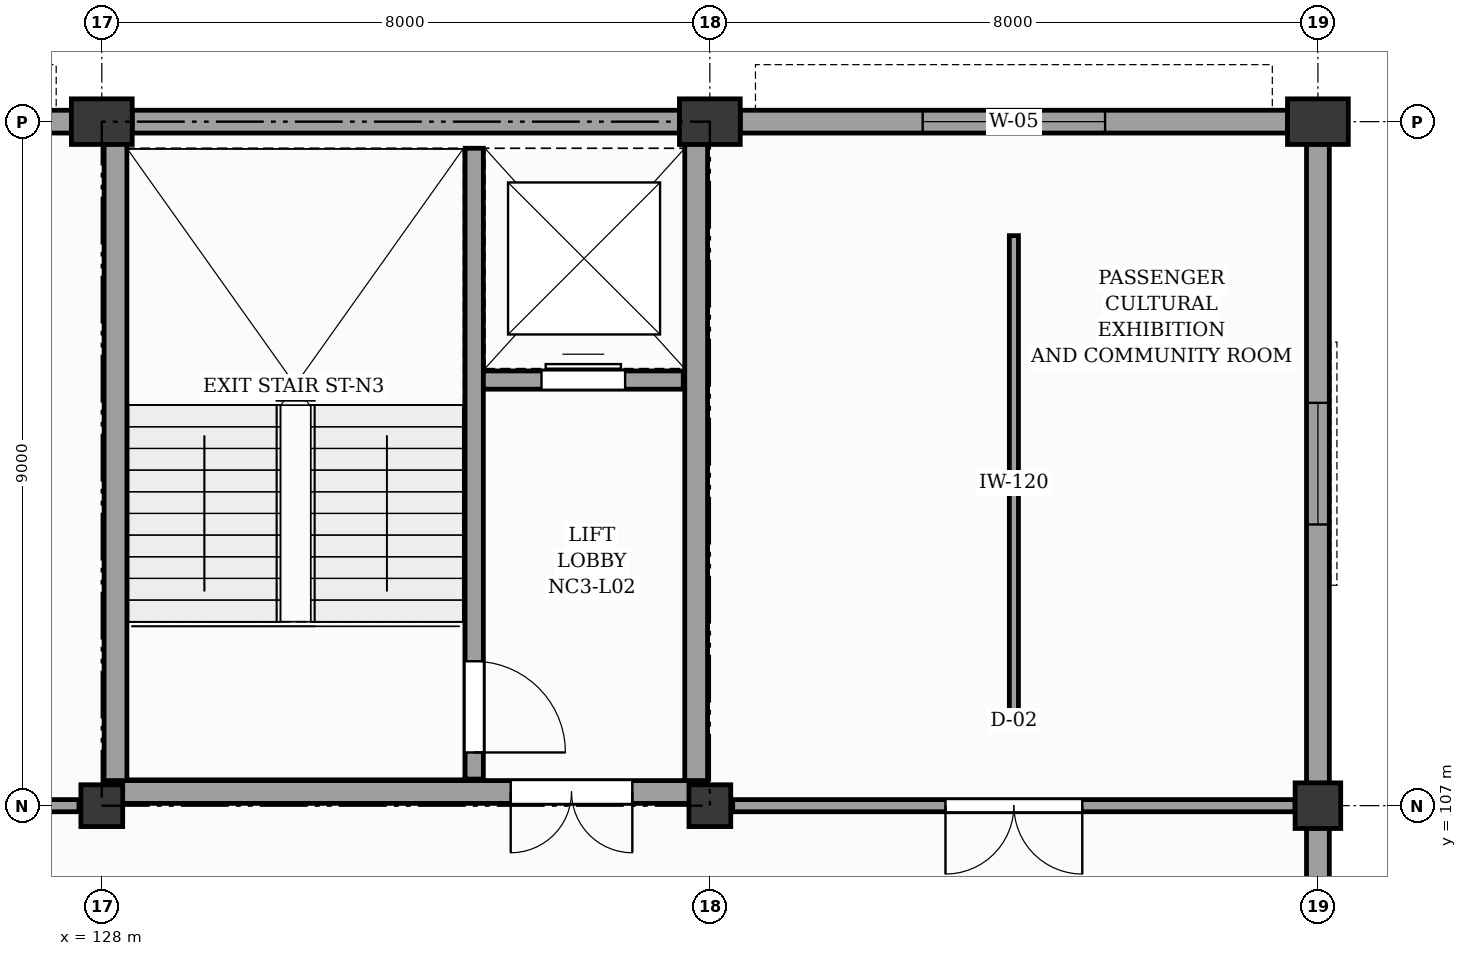
"""IFC4 building model, lengths in metres.
Left out: names, types, materials, properties, quantities, classifications, styles, units other than length and angle.
Written with IfcOpenShell. Run it as: python <this file> out.ifc"""

import sys

from ifc_helpers import new_model, si_unit, direction, frame, frame_2d, origin, origin_2d, place, context, subcontext, project, spatial, rectangle, extrude, element, fill, save


model = new_model("IFC4")
c1 = context("Model", 3, precision=1e-05, world=origin(), true_north=direction((0.0, 1.0)))
c2 = subcontext(c1, "Body", "Model", "MODEL_VIEW")
j1 = project(units=[si_unit("LENGTHUNIT", "METRE"), si_unit("PLANEANGLEUNIT", "RADIAN")], contexts=[c1])
p1 = place(None, origin())
s1 = spatial("IfcSite", under=j1, at=p1, CompositionType="ELEMENT")
p2 = place(p1, origin())
s2 = spatial("IfcBuilding", under=s1, at=p2, CompositionType="ELEMENT")
p3 = place(p2, frame((0.0, 0.0, 9.6)))
s3 = spatial("IfcBuildingStorey", under=s2, at=p3, CompositionType="ELEMENT", Elevation=9.6)
p4 = place(p3, frame((128.0, 107.0, 0.0), z_axis=(0.0, 0.0, 1.0), x_axis=(1.0, 0.0, 0.0)))
e1 = element("IfcColumn", 1, at=p4, inside=s3, PredefinedType="COLUMN", context=c2, shape_type="SweptSolid", body=[
    extrude(rectangle(XDim=0.55, YDim=0.55, at=origin_2d()), origin(), (0.0, 0.0, 1.0), 6.6),
])
p5 = place(p3, frame((128.0, 116.0, 0.0), z_axis=(0.0, 0.0, 1.0), x_axis=(1.0, 0.0, 0.0)))
e2 = element("IfcColumn", 2, at=p5, inside=s3, PredefinedType="PILASTER", context=c2, shape_type="SweptSolid", body=[
    extrude(rectangle(XDim=0.8, YDim=0.6, at=origin_2d()), origin(), (0.0, 0.0, 1.0), 6.6),
])
p6 = place(p3, frame((136.0, 107.0, 0.0), z_axis=(0.0, 0.0, 1.0), x_axis=(1.0, 0.0, 0.0)))
e3 = element("IfcColumn", 3, at=p6, inside=s3, PredefinedType="COLUMN", context=c2, shape_type="SweptSolid", body=[
    extrude(rectangle(XDim=0.55, YDim=0.55, at=origin_2d()), origin(), (0.0, 0.0, 1.0), 6.6),
])
p7 = place(p3, frame((136.0, 116.0, 0.0), z_axis=(0.0, 0.0, 1.0), x_axis=(1.0, 0.0, 0.0)))
e4 = element("IfcColumn", 4, at=p7, inside=s3, PredefinedType="PILASTER", context=c2, shape_type="SweptSolid", body=[
    extrude(rectangle(XDim=0.8, YDim=0.6, at=origin_2d()), origin(), (0.0, 0.0, 1.0), 6.6),
])
p8 = place(p3, frame((144.0, 107.0, 0.0), z_axis=(0.0, 0.0, 1.0), x_axis=(1.0, 0.0, 0.0)))
e5 = element("IfcColumn", 5, at=p8, inside=s3, PredefinedType="COLUMN", context=c2, shape_type="SweptSolid", body=[
    extrude(rectangle(XDim=0.6, YDim=0.6, at=origin_2d()), origin(), (0.0, 0.0, 1.0), 6.6),
])
p9 = place(p3, frame((144.0, 116.0, 0.0), z_axis=(0.0, 0.0, 1.0), x_axis=(1.0, 0.0, 0.0)))
e6 = element("IfcColumn", 6, at=p9, inside=s3, PredefinedType="PILASTER", context=c2, shape_type="SweptSolid", body=[
    extrude(rectangle(XDim=0.8, YDim=0.6, at=origin_2d()), origin(), (0.0, 0.0, 1.0), 6.6),
])
p10 = place(p3, frame((120.4, 116.0, 0.0), z_axis=(0.0, 0.0, 1.0), x_axis=(1.0, 0.0, 0.0)))
e7 = element("IfcWall", 7, at=p10, inside=s3, PredefinedType="SOLIDWALL", context=c2, shape_type="SweptSolid", body=[
    extrude(rectangle(XDim=7.2, YDim=0.3, at=frame_2d((3.6, 0.0))), origin(), (0.0, 0.0, 1.0), 5.24),
])
p11 = place(p10, frame((2.4, 0.0, 0.9)))
e8 = element("IfcOpeningElement", 8, at=p11, cuts=e7, PredefinedType="OPENING", context=c2, shape_type="SweptSolid", body=[
    extrude(rectangle(XDim=2.4, YDim=3.2, at=frame_2d((1.2, 1.6))), frame((0.0, 0.16, 0.0), z_axis=(0.0, -1.0, 0.0), x_axis=(1.0, 0.0, 0.0)), (0.0, 0.0, 1.0), 0.32),
])
p12 = place(p3, frame((128.4, 116.0, 0.0), z_axis=(0.0, 0.0, 1.0), x_axis=(1.0, 0.0, 0.0)))
e9 = element("IfcWall", 9, at=p12, inside=s3, PredefinedType="SOLIDWALL", context=c2, shape_type="SweptSolid", body=[
    extrude(rectangle(XDim=7.2, YDim=0.3, at=frame_2d((3.6, 0.0))), origin(), (0.0, 0.0, 1.0), 5.64),
])
p13 = place(p3, frame((136.4, 116.0, 0.0), z_axis=(0.0, 0.0, 1.0), x_axis=(1.0, 0.0, 0.0)))
e10 = element("IfcWall", 10, at=p13, inside=s3, PredefinedType="SOLIDWALL", context=c2, shape_type="SweptSolid", body=[
    extrude(rectangle(XDim=7.2, YDim=0.3, at=frame_2d((3.6, 0.0))), origin(), (0.0, 0.0, 1.0), 5.64),
])
p14 = place(p13, frame((2.4, 0.0, 0.9)))
e11 = element("IfcOpeningElement", 11, at=p14, cuts=e10, PredefinedType="OPENING", context=c2, shape_type="SweptSolid", body=[
    extrude(rectangle(XDim=2.4, YDim=3.2, at=frame_2d((1.2, 1.6))), frame((0.0, 0.16, 0.0), z_axis=(0.0, -1.0, 0.0), x_axis=(1.0, 0.0, 0.0)), (0.0, 0.0, 1.0), 0.32),
])
p15 = place(p3, frame((144.0, 98.295, 0.0), z_axis=(0.0, 0.0, 1.0), x_axis=(0.0, 1.0, 0.0)))
e12 = element("IfcWall", 12, at=p15, inside=s3, PredefinedType="SOLIDWALL", context=c2, shape_type="SweptSolid", body=[
    extrude(rectangle(XDim=8.41, YDim=0.3, at=frame_2d((4.205, 0.0))), origin(), (0.0, 0.0, 1.0), 5.64),
])
p16 = place(p15, frame((3.405, 0.0, 0.95)))
e13 = element("IfcOpeningElement", 13, at=p16, cuts=e12, PredefinedType="OPENING", context=c2, shape_type="SweptSolid", body=[
    extrude(rectangle(XDim=1.6, YDim=2.1, at=frame_2d((0.8, 1.05))), frame((0.0, 0.16, 0.0), z_axis=(0.0, -1.0, 0.0), x_axis=(1.0, 0.0, 0.0)), (0.0, 0.0, 1.0), 0.32),
])
p17 = place(p3, frame((144.0, 107.295, 0.0), z_axis=(0.0, 0.0, 1.0), x_axis=(0.0, 1.0, 0.0)))
e14 = element("IfcWall", 14, at=p17, inside=s3, PredefinedType="SOLIDWALL", context=c2, shape_type="SweptSolid", body=[
    extrude(rectangle(XDim=8.41, YDim=0.3, at=frame_2d((4.205, 0.0))), origin(), (0.0, 0.0, 1.0), 5.64),
])
p18 = place(p17, frame((3.405, 0.0, 0.95)))
e15 = element("IfcOpeningElement", 15, at=p18, cuts=e14, PredefinedType="OPENING", context=c2, shape_type="SweptSolid", body=[
    extrude(rectangle(XDim=1.6, YDim=2.1, at=frame_2d((0.8, 1.05))), frame((0.0, 0.16, 0.0), z_axis=(0.0, -1.0, 0.0), x_axis=(1.0, 0.0, 0.0)), (0.0, 0.0, 1.0), 0.32),
])
p19 = place(p3, frame((132.9, 107.35, 0.0), z_axis=(0.0, 0.0, 1.0), x_axis=(0.0, 1.0, 0.0)))
e16 = element("IfcWall", 16, at=p19, inside=s3, PredefinedType="SHEAR", context=c2, shape_type="SweptSolid", body=[
    extrude(rectangle(XDim=8.3, YDim=0.24, at=frame_2d((4.15, 0.0))), origin(), (0.0, 0.0, 1.0), 6.32),
])
p20 = place(p19, frame((0.35, 0.0, 0.0)))
e17 = element("IfcOpeningElement", 17, at=p20, cuts=e16, PredefinedType="OPENING", context=c2, shape_type="SweptSolid", body=[
    extrude(rectangle(XDim=1.2, YDim=2.15, at=frame_2d((0.6, 1.075))), frame((0.0, 0.13, 0.0), z_axis=(0.0, -1.0, 0.0), x_axis=(1.0, 0.0, 0.0)), (0.0, 0.0, 1.0), 0.26),
])
p21 = place(p3, frame((133.02, 112.6, 0.0), z_axis=(0.0, 0.0, 1.0), x_axis=(1.0, 0.0, 0.0)))
e18 = element("IfcWall", 18, at=p21, inside=s3, PredefinedType="SHEAR", context=c2, shape_type="SweptSolid", body=[
    extrude(rectangle(XDim=2.63, YDim=0.24, at=frame_2d((1.315, 0.0))), origin(), (0.0, 0.0, 1.0), 6.32),
])
p22 = place(p21, frame((0.765, 0.0, 0.0)))
e19 = element("IfcOpeningElement", 19, at=p22, cuts=e18, PredefinedType="OPENING", context=c2, shape_type="SweptSolid", body=[
    extrude(rectangle(XDim=1.1, YDim=2.15, at=frame_2d((0.55, 1.075))), frame((0.0, 0.13, 0.0), z_axis=(0.0, -1.0, 0.0), x_axis=(1.0, 0.0, 0.0)), (0.0, 0.0, 1.0), 0.26),
])
for number, where, z_axis, x_axis in (
    (20, (128.18, 107.18, 0.0), (0.0, 0.0, 1.0), (0.0, 1.0, 0.0)),
    (21, (135.82, 107.18, 0.0), (0.0, 0.0, 1.0), (0.0, 1.0, 0.0)),
):
    element("IfcWall", number, at=place(p3, frame(where, z_axis=z_axis, x_axis=x_axis)), inside=s3, PredefinedType="SHEAR", context=c2, shape_type="SweptSolid", body=[
        extrude(rectangle(XDim=8.64, YDim=0.3, at=frame_2d((4.32, 0.0))), origin(), (0.0, 0.0, 1.0), 6.32),
    ])
p23 = place(p3, frame((128.03, 107.18, 0.0), z_axis=(0.0, 0.0, 1.0), x_axis=(1.0, 0.0, 0.0)))
e22 = element("IfcWall", 22, at=p23, inside=s3, PredefinedType="SHEAR", context=c2, shape_type="SweptSolid", body=[
    extrude(rectangle(XDim=7.94, YDim=0.3, at=frame_2d((3.97, 0.0))), origin(), (0.0, 0.0, 1.0), 6.32),
])
p24 = place(p23, frame((5.35, 0.0, 0.0)))
e23 = element("IfcOpeningElement", 23, at=p24, cuts=e22, PredefinedType="OPENING", context=c2, shape_type="SweptSolid", body=[
    extrude(rectangle(XDim=1.6, YDim=2.15, at=frame_2d((0.8, 1.075))), frame((0.0, 0.16, 0.0), z_axis=(0.0, -1.0, 0.0), x_axis=(1.0, 0.0, 0.0)), (0.0, 0.0, 1.0), 0.32),
])
p25 = place(p3, frame((120.3, 107.0, 0.0), z_axis=(0.0, 0.0, 1.0), x_axis=(1.0, 0.0, 0.0)))
e24 = element("IfcWall", 24, at=p25, inside=s3, PredefinedType="PARTITIONING", context=c2, shape_type="SweptSolid", body=[
    extrude(rectangle(XDim=7.4, YDim=0.16, at=frame_2d((3.7, 0.0))), origin(), (0.0, 0.0, 1.0), 4.83),
])
p26 = place(p3, frame((136.3, 107.0, 0.0), z_axis=(0.0, 0.0, 1.0), x_axis=(1.0, 0.0, 0.0)))
e25 = element("IfcWall", 25, at=p26, inside=s3, PredefinedType="PARTITIONING", context=c2, shape_type="SweptSolid", body=[
    extrude(rectangle(XDim=7.4, YDim=0.16, at=frame_2d((3.7, 0.0))), origin(), (0.0, 0.0, 1.0), 5.5),
])
p27 = place(p26, frame((2.8, 0.0, 0.0)))
e26 = element("IfcOpeningElement", 26, at=p27, cuts=e25, PredefinedType="OPENING", context=c2, shape_type="SweptSolid", body=[
    extrude(rectangle(XDim=1.8, YDim=2.25, at=frame_2d((0.9, 1.125))), frame((0.0, 0.09, 0.0), z_axis=(0.0, -1.0, 0.0), x_axis=(1.0, 0.0, 0.0)), (0.0, 0.0, 1.0), 0.18),
])
p28 = place(p3, frame((140.0, 108.0, 0.0), z_axis=(0.0, 0.0, 1.0), x_axis=(0.0, 1.0, 0.0)))
e27 = element("IfcWall", 27, at=p28, inside=s3, PredefinedType="MOVABLE", context=c2, shape_type="SweptSolid", body=[
    extrude(rectangle(XDim=6.5, YDim=0.12, at=frame_2d((3.25, 0.0))), origin(), (0.0, 0.0, 1.0), 4.6),
])
p29 = place(p14, origin())
e28 = element("IfcWindow", 28, at=p29, inside=s3, PartitioningType="SINGLE_PANEL", PredefinedType="WINDOW", context=c2, shape_type="SweptSolid", body=[
    extrude(rectangle(XDim=2.4, YDim=3.2, at=frame_2d((1.2, 1.6))), frame((0.0, 0.03, 0.0), z_axis=(0.0, -1.0, 0.0), x_axis=(1.0, 0.0, 0.0)), (0.0, 0.0, 1.0), 0.06),
])
fill(e11, e28)
p30 = place(p18, origin())
e29 = element("IfcWindow", 29, at=p30, inside=s3, PartitioningType="SINGLE_PANEL", PredefinedType="WINDOW", context=c2, shape_type="SweptSolid", body=[
    extrude(rectangle(XDim=1.6, YDim=2.1, at=frame_2d((0.8, 1.05))), frame((0.0, 0.03, 0.0), z_axis=(0.0, -1.0, 0.0), x_axis=(1.0, 0.0, 0.0)), (0.0, 0.0, 1.0), 0.06),
])
fill(e15, e29)
p31 = place(p20, frame((1.2, 0.0, 0.0), z_axis=(0.0, 0.0, 1.0), x_axis=(-1.0, 0.0, 0.0)))
e30 = element("IfcDoor", 30, at=p31, inside=s3, OperationType="SINGLE_SWING_LEFT", PredefinedType="DOOR", context=c2, shape_type="SweptSolid", body=[
    extrude(rectangle(XDim=1.2, YDim=2.15, at=frame_2d((0.6, 1.075))), frame((0.0, 0.025, 0.0), z_axis=(0.0, -1.0, 0.0), x_axis=(1.0, 0.0, 0.0)), (0.0, 0.0, 1.0), 0.05),
])
fill(e17, e30)
p32 = place(p22, origin())
e31 = element("IfcDoor", 31, at=p32, inside=s3, OperationType="DOUBLE_DOOR_SLIDING", PredefinedType="DOOR", context=c2, shape_type="SweptSolid", body=[
    extrude(rectangle(XDim=1.1, YDim=2.15, at=frame_2d((0.55, 1.075))), frame((0.0, 0.025, 0.0), z_axis=(0.0, -1.0, 0.0), x_axis=(1.0, 0.0, 0.0)), (0.0, 0.0, 1.0), 0.05),
])
fill(e19, e31)
p33 = place(p24, frame((1.6, 0.0, 0.0), z_axis=(0.0, 0.0, 1.0), x_axis=(-1.0, 0.0, 0.0)))
e32 = element("IfcDoor", 32, at=p33, inside=s3, OperationType="DOUBLE_DOOR_SINGLE_SWING", PredefinedType="DOOR", context=c2, shape_type="SweptSolid", body=[
    extrude(rectangle(XDim=1.6, YDim=2.15, at=frame_2d((0.8, 1.075))), frame((0.0, 0.025, 0.0), z_axis=(0.0, -1.0, 0.0), x_axis=(1.0, 0.0, 0.0)), (0.0, 0.0, 1.0), 0.05),
])
fill(e23, e32)
p34 = place(p27, frame((1.8, 0.0, 0.0), z_axis=(0.0, 0.0, 1.0), x_axis=(-1.0, 0.0, 0.0)))
e33 = element("IfcDoor", 33, at=p34, inside=s3, OperationType="DOUBLE_DOOR_SINGLE_SWING", PredefinedType="DOOR", context=c2, shape_type="SweptSolid", body=[
    extrude(rectangle(XDim=1.8, YDim=2.25, at=frame_2d((0.9, 1.125))), frame((0.0, 0.025, 0.0), z_axis=(0.0, -1.0, 0.0), x_axis=(1.0, 0.0, 0.0)), (0.0, 0.0, 1.0), 0.05),
])
fill(e26, e33)
save(model, sys.argv[1])
